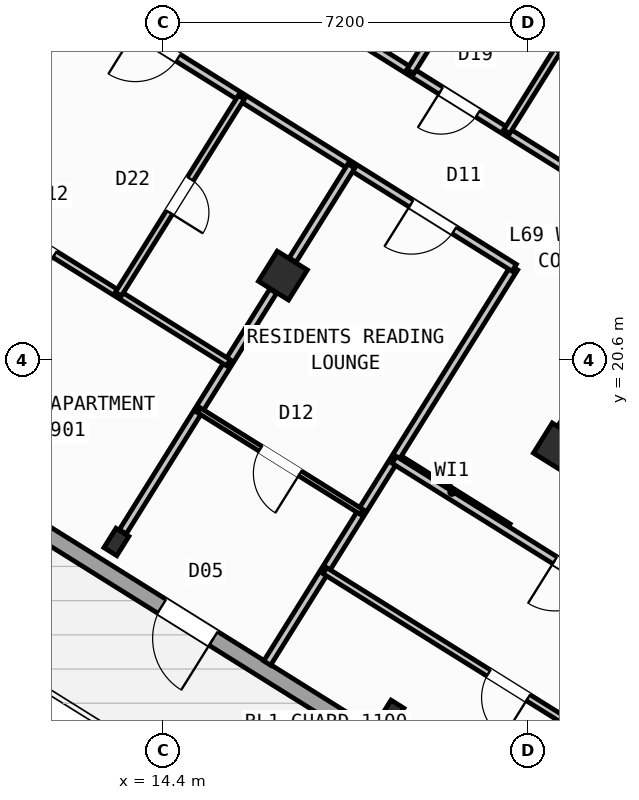
"""IFC4 building model, lengths in metres.
Left out: names, types, materials, properties, quantities, classifications, styles, units other than length and angle.
Written with IfcOpenShell. Run it as: python <this file> out.ifc"""

import sys

from ifc_helpers import new_model, si_unit, direction, frame, frame_2d, origin, origin_2d, place, context, subcontext, project, spatial, rectangle, hollow_rectangle, i_section, extrude, source, transform, mapped, element, fill, save


model = new_model("IFC4")
c1 = context("Model", 3, precision=1e-05, world=origin(), true_north=direction((0.0, 1.0)))
c2 = subcontext(c1, "Body", "Model", "MODEL_VIEW")
j1 = project(units=[si_unit("LENGTHUNIT", "METRE"), si_unit("PLANEANGLEUNIT", "RADIAN")], contexts=[c1])
p1 = place(None, origin())
s1 = spatial("IfcSite", under=j1, at=p1, CompositionType="ELEMENT")
p2 = place(p1, origin())
s2 = spatial("IfcBuilding", under=s1, at=p2, CompositionType="ELEMENT")
p3 = place(p2, frame((0.0, 0.0, 273.6)))
s3 = spatial("IfcBuildingStorey", under=s2, at=p3, CompositionType="ELEMENT", Elevation=273.6)
p4 = place(p3, frame((33.324, 12.503, 0.0), z_axis=(0.0, 0.0, 1.0), x_axis=(-0.848043529849, 0.529926571782, 0.0)))
e1 = element("IfcWall", 1, at=p4, inside=s3, PredefinedType="SHEAR", context=c2, shape_type="SweptSolid", body=[
    extrude(rectangle(XDim=13.04, YDim=0.45, at=frame_2d((6.52, 0.0))), origin(), (0.0, 0.0, 1.0), 3.35),
])
m1 = source(origin(), c2, "Body", "SweptSolid", [
    extrude(hollow_rectangle(XDim=0.7, YDim=0.7, WallThickness=0.028, at=origin_2d()), origin(), (0.0, 0.0, 1.0), 3.6),
])
p5 = place(p3, frame((22.191, 18.87, 0.0), z_axis=(0.0, 0.0, 1.0), x_axis=(-0.848048096156, 0.529919264233, 0.0)))
e2 = element("IfcColumn", 2, at=p5, inside=s3, PredefinedType="COLUMN", context=c2, shape_type="MappedRepresentation", body=[
    mapped(m1, transform((0.0, 0.0, 0.0), scale=1.0)),
])
m2 = source(origin(), c2, "Body", "SweptSolid", [
    extrude(i_section(OverallWidth=0.3, OverallDepth=0.45, WebThickness=0.014, FlangeThickness=0.026, at=origin_2d()), origin(), (0.0, 0.0, 1.0), 3.6),
])
p6 = place(p3, frame((18.906, 13.612, 0.0), z_axis=(0.0, 0.0, 1.0), x_axis=(-0.848048096156, 0.529919264233, 0.0)))
e3 = element("IfcColumn", 3, at=p6, inside=s3, PredefinedType="COLUMN", context=c2, shape_type="MappedRepresentation", body=[
    mapped(m2, transform((0.0, 0.0, 0.0), scale=1.0)),
])
p7 = place(p3, frame((16.764, 22.261, 0.0), z_axis=(0.0, 0.0, 1.0), x_axis=(-0.848048096156, 0.529919264233, 0.0)))
e4 = element("IfcColumn", 4, at=p7, inside=s3, PredefinedType="COLUMN", context=c2, shape_type="MappedRepresentation", body=[
    mapped(m1, transform((0.0, 0.0, 0.0), scale=1.0)),
])
p8 = place(p3, frame((13.478, 17.003, 0.0), z_axis=(0.0, 0.0, 1.0), x_axis=(-0.848048096156, 0.529919264233, 0.0)))
e5 = element("IfcColumn", 5, at=p8, inside=s3, PredefinedType="COLUMN", context=c2, shape_type="MappedRepresentation", body=[
    mapped(m2, transform((0.0, 0.0, 0.0), scale=1.0)),
])
p9 = place(p3, frame((29.268, 6.429, 0.0), z_axis=(0.0, 0.0, 1.0), x_axis=(-0.848049971435, 0.529916263149, 0.0)))
e6 = element("IfcWall", 6, at=p9, inside=s3, PredefinedType="STANDARD", context=c2, shape_type="SweptSolid", body=[
    extrude(rectangle(XDim=31.588, YDim=0.32, at=frame_2d((15.794, 0.0))), origin(), (0.0, 0.0, 1.0), 3.35),
])
p10 = place(p9, frame((16.362, 0.0, 0.0)))
e7 = element("IfcOpeningElement", 7, at=p10, cuts=e6, PredefinedType="OPENING", context=c2, shape_type="SweptSolid", body=[
    extrude(rectangle(XDim=1.2, YDim=2.15, at=frame_2d((0.6, 1.075))), frame((0.0, 0.17, 0.0), z_axis=(0.0, -1.0, 0.0), x_axis=(1.0, 0.0, 0.0)), (0.0, 0.0, 1.0), 0.34),
])
p11 = place(p9, frame((3.859, 0.0, 0.9)))
e8 = element("IfcOpeningElement", 8, at=p11, cuts=e6, PredefinedType="OPENING", context=c2, shape_type="SweptSolid", body=[
    extrude(rectangle(XDim=1.65, YDim=1.45, at=frame_2d((0.825, 0.725))), frame((0.0, 0.17, 0.0), z_axis=(0.0, -1.0, 0.0), x_axis=(1.0, 0.0, 0.0)), (0.0, 0.0, 1.0), 0.34),
])
p12 = place(p9, frame((10.519, 0.0, 0.9)))
e9 = element("IfcOpeningElement", 9, at=p12, cuts=e6, PredefinedType="OPENING", context=c2, shape_type="SweptSolid", body=[
    extrude(rectangle(XDim=1.65, YDim=1.45, at=frame_2d((0.825, 0.725))), frame((0.0, 0.17, 0.0), z_axis=(0.0, -1.0, 0.0), x_axis=(1.0, 0.0, 0.0)), (0.0, 0.0, 1.0), 0.34),
])
p13 = place(p9, frame((21.219, 0.0, 0.95)))
e10 = element("IfcOpeningElement", 10, at=p13, cuts=e6, PredefinedType="OPENING", context=c2, shape_type="SweptSolid", body=[
    extrude(rectangle(XDim=1.95, YDim=1.35, at=frame_2d((0.975, 0.675))), frame((0.0, 0.17, 0.0), z_axis=(0.0, -1.0, 0.0), x_axis=(1.0, 0.0, 0.0)), (0.0, 0.0, 1.0), 0.34),
])
p14 = place(p9, frame((26.406, 0.0, 1.0)))
e11 = element("IfcOpeningElement", 11, at=p14, cuts=e6, PredefinedType="OPENING", context=c2, shape_type="SweptSolid", body=[
    extrude(rectangle(XDim=0.9, YDim=1.25, at=frame_2d((0.45, 0.625))), frame((0.0, 0.17, 0.0), z_axis=(0.0, -1.0, 0.0), x_axis=(1.0, 0.0, 0.0)), (0.0, 0.0, 1.0), 0.34),
])
p15 = place(p9, frame((29.143, 0.0, 0.9)))
e12 = element("IfcOpeningElement", 12, at=p15, cuts=e6, PredefinedType="OPENING", context=c2, shape_type="SweptSolid", body=[
    extrude(rectangle(XDim=1.65, YDim=1.45, at=frame_2d((0.825, 0.725))), frame((0.0, 0.17, 0.0), z_axis=(0.0, -1.0, 0.0), x_axis=(1.0, 0.0, 0.0)), (0.0, 0.0, 1.0), 0.34),
])
p16 = place(p3, frame((2.415, 23.452, 0.0), z_axis=(0.0, 0.0, 1.0), x_axis=(0.52991049553, 0.848053575387, 0.0)))
e13 = element("IfcWall", 13, at=p16, inside=s3, PredefinedType="STANDARD", context=c2, shape_type="SweptSolid", body=[
    extrude(rectangle(XDim=21.587, YDim=0.32, at=frame_2d((10.794, 0.0))), origin(), (0.0, 0.0, 1.0), 2.875),
])
p17 = place(p16, frame((2.606, 0.0, 0.9)))
e14 = element("IfcOpeningElement", 14, at=p17, cuts=e13, PredefinedType="OPENING", context=c2, shape_type="SweptSolid", body=[
    extrude(rectangle(XDim=1.65, YDim=1.45, at=frame_2d((0.825, 0.725))), frame((0.0, 0.17, 0.0), z_axis=(0.0, -1.0, 0.0), x_axis=(1.0, 0.0, 0.0)), (0.0, 0.0, 1.0), 0.34),
])
p18 = place(p16, frame((7.504, 0.0, 1.0)))
e15 = element("IfcOpeningElement", 15, at=p18, cuts=e13, PredefinedType="OPENING", context=c2, shape_type="SweptSolid", body=[
    extrude(rectangle(XDim=0.9, YDim=1.25, at=frame_2d((0.45, 0.625))), frame((0.0, 0.17, 0.0), z_axis=(0.0, -1.0, 0.0), x_axis=(1.0, 0.0, 0.0)), (0.0, 0.0, 1.0), 0.34),
])
p19 = place(p16, frame((12.084, 0.0, 1.0)))
e16 = element("IfcOpeningElement", 16, at=p19, cuts=e13, PredefinedType="OPENING", context=c2, shape_type="SweptSolid", body=[
    extrude(rectangle(XDim=0.9, YDim=1.25, at=frame_2d((0.45, 0.625))), frame((0.0, 0.17, 0.0), z_axis=(0.0, -1.0, 0.0), x_axis=(1.0, 0.0, 0.0)), (0.0, 0.0, 1.0), 0.34),
])
p20 = place(p16, frame((15.619, 0.0, 1.0)))
e17 = element("IfcOpeningElement", 17, at=p20, cuts=e13, PredefinedType="OPENING", context=c2, shape_type="SweptSolid", body=[
    extrude(rectangle(XDim=0.9, YDim=1.25, at=frame_2d((0.45, 0.625))), frame((0.0, 0.17, 0.0), z_axis=(0.0, -1.0, 0.0), x_axis=(1.0, 0.0, 0.0)), (0.0, 0.0, 1.0), 0.34),
])
p21 = place(p16, frame((18.569, 0.0, 1.0)))
e18 = element("IfcOpeningElement", 18, at=p21, cuts=e13, PredefinedType="OPENING", context=c2, shape_type="SweptSolid", body=[
    extrude(rectangle(XDim=0.9, YDim=1.25, at=frame_2d((0.45, 0.625))), frame((0.0, 0.17, 0.0), z_axis=(0.0, -1.0, 0.0), x_axis=(1.0, 0.0, 0.0)), (0.0, 0.0, 1.0), 0.34),
])
p22 = place(p3, frame((14.138, 41.825, 0.0), z_axis=(0.0, 0.0, 1.0), x_axis=(0.848046498049, -0.529921821731, 0.0)))
e19 = element("IfcWall", 19, at=p22, inside=s3, PredefinedType="STANDARD", context=c2, shape_type="SweptSolid", body=[
    extrude(rectangle(XDim=31.588, YDim=0.32, at=frame_2d((15.794, 0.0))), origin(), (0.0, 0.0, 1.0), 3.35),
])
p23 = place(p22, frame((3.46, 0.0, 0.0)))
e20 = element("IfcOpeningElement", 20, at=p23, cuts=e19, PredefinedType="OPENING", context=c2, shape_type="SweptSolid", body=[
    extrude(rectangle(XDim=1.05, YDim=2.15, at=frame_2d((0.525, 1.075))), frame((0.0, 0.17, 0.0), z_axis=(0.0, -1.0, 0.0), x_axis=(1.0, 0.0, 0.0)), (0.0, 0.0, 1.0), 0.34),
])
p24 = place(p22, frame((0.831, 0.0, 1.0)))
e21 = element("IfcOpeningElement", 21, at=p24, cuts=e19, PredefinedType="OPENING", context=c2, shape_type="SweptSolid", body=[
    extrude(rectangle(XDim=0.9, YDim=1.25, at=frame_2d((0.45, 0.625))), frame((0.0, 0.17, 0.0), z_axis=(0.0, -1.0, 0.0), x_axis=(1.0, 0.0, 0.0)), (0.0, 0.0, 1.0), 0.34),
])
p25 = place(p22, frame((8.719, 0.0, 0.9)))
e22 = element("IfcOpeningElement", 22, at=p25, cuts=e19, PredefinedType="OPENING", context=c2, shape_type="SweptSolid", body=[
    extrude(rectangle(XDim=1.35, YDim=1.45, at=frame_2d((0.675, 0.725))), frame((0.0, 0.17, 0.0), z_axis=(0.0, -1.0, 0.0), x_axis=(1.0, 0.0, 0.0)), (0.0, 0.0, 1.0), 0.34),
])
p26 = place(p22, frame((13.599, 0.0, 0.95)))
e23 = element("IfcOpeningElement", 23, at=p26, cuts=e19, PredefinedType="OPENING", context=c2, shape_type="SweptSolid", body=[
    extrude(rectangle(XDim=1.95, YDim=1.35, at=frame_2d((0.975, 0.675))), frame((0.0, 0.17, 0.0), z_axis=(0.0, -1.0, 0.0), x_axis=(1.0, 0.0, 0.0)), (0.0, 0.0, 1.0), 0.34),
])
p27 = place(p22, frame((17.154, 0.0, 1.0)))
e24 = element("IfcOpeningElement", 24, at=p27, cuts=e19, PredefinedType="OPENING", context=c2, shape_type="SweptSolid", body=[
    extrude(rectangle(XDim=0.9, YDim=1.25, at=frame_2d((0.45, 0.625))), frame((0.0, 0.17, 0.0), z_axis=(0.0, -1.0, 0.0), x_axis=(1.0, 0.0, 0.0)), (0.0, 0.0, 1.0), 0.34),
])
p28 = place(p22, frame((21.719, 0.0, 0.9)))
e25 = element("IfcOpeningElement", 25, at=p28, cuts=e19, PredefinedType="OPENING", context=c2, shape_type="SweptSolid", body=[
    extrude(rectangle(XDim=1.65, YDim=1.45, at=frame_2d((0.825, 0.725))), frame((0.0, 0.17, 0.0), z_axis=(0.0, -1.0, 0.0), x_axis=(1.0, 0.0, 0.0)), (0.0, 0.0, 1.0), 0.34),
])
p29 = place(p22, frame((27.419, 0.0, 0.9)))
e26 = element("IfcOpeningElement", 26, at=p29, cuts=e19, PredefinedType="OPENING", context=c2, shape_type="SweptSolid", body=[
    extrude(rectangle(XDim=1.65, YDim=1.45, at=frame_2d((0.825, 0.725))), frame((0.0, 0.17, 0.0), z_axis=(0.0, -1.0, 0.0), x_axis=(1.0, 0.0, 0.0)), (0.0, 0.0, 1.0), 0.34),
])
p30 = place(p3, frame((21.206, 17.292, 0.0), z_axis=(0.0, 0.0, 1.0), x_axis=(-0.848050851465, 0.529914854792, 0.0)))
e27 = element("IfcWall", 27, at=p30, inside=s3, PredefinedType="PARTITIONING", context=c2, shape_type="SweptSolid", body=[
    extrude(rectangle(XDim=2.61, YDim=0.16, at=frame_2d((1.305, 0.0))), origin(), (0.0, 0.0, 1.0), 3.34),
])
p31 = place(p3, frame((21.329, 22.416, 0.0), z_axis=(0.0, 0.0, 1.0), x_axis=(-0.529920220799, -0.848047498427, 0.0)))
e28 = element("IfcWall", 28, at=p31, inside=s3, PredefinedType="PARTITIONING", context=c2, shape_type="SweptSolid", body=[
    extrude(rectangle(XDim=9.2, YDim=0.16, at=frame_2d((4.6, 0.0))), origin(), (0.0, 0.0, 1.0), 3.34),
])
p32 = place(p3, frame((22.495, 24.281, 0.0), z_axis=(0.0, 0.0, 1.0), x_axis=(-0.848052408131, 0.529912363569, 0.0)))
e29 = element("IfcWall", 29, at=p32, inside=s3, PredefinedType="PARTITIONING", context=c2, shape_type="SweptSolid", body=[
    extrude(rectangle(XDim=16.73, YDim=0.16, at=frame_2d((8.365, 0.0))), origin(), (0.0, 0.0, 1.0), 3.34),
])
p33 = place(p32, frame((2.22, 0.0, 0.0)))
e30 = element("IfcOpeningElement", 30, at=p33, cuts=e29, PredefinedType="OPENING", context=c2, shape_type="SweptSolid", body=[
    extrude(rectangle(XDim=0.86, YDim=2.05, at=frame_2d((0.43, 1.025))), frame((0.0, 0.09, 0.0), z_axis=(0.0, -1.0, 0.0), x_axis=(1.0, 0.0, 0.0)), (0.0, 0.0, 1.0), 0.18),
])
p34 = place(p32, frame((6.49, 0.0, 0.0)))
e31 = element("IfcOpeningElement", 31, at=p34, cuts=e29, PredefinedType="OPENING", context=c2, shape_type="SweptSolid", body=[
    extrude(rectangle(XDim=1.0, YDim=2.1, at=frame_2d((0.5, 1.05))), frame((0.0, 0.09, 0.0), z_axis=(0.0, -1.0, 0.0), x_axis=(1.0, 0.0, 0.0)), (0.0, 0.0, 1.0), 0.18),
])
p35 = place(p32, frame((14.76, 0.0, 0.0)))
e32 = element("IfcOpeningElement", 32, at=p35, cuts=e29, PredefinedType="OPENING", context=c2, shape_type="SweptSolid", body=[
    extrude(rectangle(XDim=1.0, YDim=2.1, at=frame_2d((0.5, 1.05))), frame((0.0, 0.09, 0.0), z_axis=(0.0, -1.0, 0.0), x_axis=(1.0, 0.0, 0.0)), (0.0, 0.0, 1.0), 0.18),
])
p36 = place(p3, frame((21.329, 22.416, 0.0), z_axis=(0.0, 0.0, 1.0), x_axis=(-0.848052408131, 0.529912363569, 0.0)))
e33 = element("IfcWall", 33, at=p36, inside=s3, PredefinedType="PARTITIONING", context=c2, shape_type="SweptSolid", body=[
    extrude(rectangle(XDim=16.73, YDim=0.16, at=frame_2d((8.365, 0.0))), origin(), (0.0, 0.0, 1.0), 3.34),
])
p37 = place(p36, frame((1.395, 0.0, 0.0)))
e34 = element("IfcOpeningElement", 34, at=p37, cuts=e33, PredefinedType="OPENING", context=c2, shape_type="SweptSolid", body=[
    extrude(rectangle(XDim=1.0, YDim=2.1, at=frame_2d((0.5, 1.05))), frame((0.0, 0.09, 0.0), z_axis=(0.0, -1.0, 0.0), x_axis=(1.0, 0.0, 0.0)), (0.0, 0.0, 1.0), 0.18),
])
p38 = place(p36, frame((7.82, 0.0, 0.0)))
e35 = element("IfcOpeningElement", 35, at=p38, cuts=e33, PredefinedType="OPENING", context=c2, shape_type="SweptSolid", body=[
    extrude(rectangle(XDim=1.0, YDim=2.1, at=frame_2d((0.5, 1.05))), frame((0.0, 0.09, 0.0), z_axis=(0.0, -1.0, 0.0), x_axis=(1.0, 0.0, 0.0)), (0.0, 0.0, 1.0), 0.18),
])
p39 = place(p36, frame((11.14, 0.0, 0.0)))
e36 = element("IfcOpeningElement", 36, at=p39, cuts=e33, PredefinedType="OPENING", context=c2, shape_type="SweptSolid", body=[
    extrude(rectangle(XDim=1.0, YDim=2.1, at=frame_2d((0.5, 1.05))), frame((0.0, 0.09, 0.0), z_axis=(0.0, -1.0, 0.0), x_axis=(1.0, 0.0, 0.0)), (0.0, 0.0, 1.0), 0.18),
])
p40 = place(p3, frame((18.115, 24.424, 0.0), z_axis=(0.0, 0.0, 1.0), x_axis=(-0.529998940003, -0.847998304005, 0.0)))
e37 = element("IfcWall", 37, at=p40, inside=s3, PredefinedType="PARTITIONING", context=c2, shape_type="SweptSolid", body=[
    extrude(rectangle(XDim=2.188, YDim=0.16, at=frame_2d((1.094, 0.0))), origin(), (0.0, 0.0, 1.0), 2.875),
])
p41 = place(p3, frame((16.572, 21.954, 0.0), z_axis=(0.0, 0.0, 1.0), x_axis=(-0.529904903214, -0.848057069748, 0.0)))
e38 = element("IfcWall", 38, at=p41, inside=s3, PredefinedType="PARTITIONING", context=c2, shape_type="SweptSolid", body=[
    extrude(rectangle(XDim=5.601, YDim=0.16, at=frame_2d((2.801, 0.0))), origin(), (0.0, 0.0, 1.0), 2.875),
])
p42 = place(p3, frame((18.318, 17.597, 0.0), z_axis=(0.0, 0.0, 1.0), x_axis=(-0.848059820872, 0.529900500304, 0.0)))
e39 = element("IfcWall", 39, at=p42, inside=s3, PredefinedType="PARTITIONING", context=c2, shape_type="SweptSolid", body=[
    extrude(rectangle(XDim=3.79, YDim=0.11, at=frame_2d((1.895, 0.0))), origin(), (0.0, 0.0, 1.0), 3.34),
])
p43 = place(p42, frame((1.435, 0.0, 0.0)))
e40 = element("IfcOpeningElement", 40, at=p43, cuts=e39, PredefinedType="OPENING", context=c2, shape_type="SweptSolid", body=[
    extrude(rectangle(XDim=0.92, YDim=2.08, at=frame_2d((0.46, 1.04))), frame((0.0, 0.065, 0.0), z_axis=(0.0, -1.0, 0.0), x_axis=(1.0, 0.0, 0.0)), (0.0, 0.0, 1.0), 0.13),
])
p44 = place(p3, frame((12.688, 27.815, 0.0), z_axis=(0.0, 0.0, 1.0), x_axis=(-0.52994879608, -0.848029641896, 0.0)))
e41 = element("IfcWall", 41, at=p44, inside=s3, PredefinedType="PARTITIONING", context=c2, shape_type="SweptSolid", body=[
    extrude(rectangle(XDim=2.188, YDim=0.16, at=frame_2d((1.094, 0.0))), origin(), (0.0, 0.0, 1.0), 2.875),
])
p45 = place(p3, frame((15.688, 20.54, 0.0), z_axis=(0.0, 0.0, 1.0), x_axis=(-0.848049732085, 0.529916646191, 0.0)))
e42 = element("IfcWall", 42, at=p45, inside=s3, PredefinedType="PLUMBINGWALL", context=c2, shape_type="SweptSolid", body=[
    extrude(rectangle(XDim=6.4, YDim=0.14, at=frame_2d((3.2, 0.0))), origin(), (0.0, 0.0, 1.0), 3.34),
])
p46 = place(p45, frame((4.04, 0.0, 0.0)))
e43 = element("IfcOpeningElement", 43, at=p46, cuts=e42, PredefinedType="OPENING", context=c2, shape_type="SweptSolid", body=[
    extrude(rectangle(XDim=0.92, YDim=2.08, at=frame_2d((0.46, 1.04))), frame((0.0, 0.08, 0.0), z_axis=(0.0, -1.0, 0.0), x_axis=(1.0, 0.0, 0.0)), (0.0, 0.0, 1.0), 0.16),
])
p47 = place(p3, frame((15.944, 25.781, 0.0), z_axis=(0.0, 0.0, 1.0), x_axis=(-0.529917480809, -0.848049210561, 0.0)))
e44 = element("IfcWall", 44, at=p47, inside=s3, PredefinedType="PLUMBINGWALL", context=c2, shape_type="SweptSolid", body=[
    extrude(rectangle(XDim=4.58, YDim=0.14, at=frame_2d((2.29, 0.0))), origin(), (0.0, 0.0, 1.0), 3.34),
])
p48 = place(p47, frame((1.9, 0.0, 0.0)))
e45 = element("IfcOpeningElement", 45, at=p48, cuts=e44, PredefinedType="OPENING", context=c2, shape_type="SweptSolid", body=[
    extrude(rectangle(XDim=0.78, YDim=2.05, at=frame_2d((0.39, 1.025))), frame((0.0, 0.08, 0.0), z_axis=(0.0, -1.0, 0.0), x_axis=(1.0, 0.0, 0.0)), (0.0, 0.0, 1.0), 0.16),
])
p49 = place(p3, frame((20.44, 28.145, 0.0), z_axis=(0.0, 0.0, 1.0), x_axis=(-0.5299186965, -0.848048450915, 0.0)))
e46 = element("IfcWall", 46, at=p49, inside=s3, PredefinedType="PARTITIONING", context=c2, shape_type="SweptSolid", body=[
    extrude(rectangle(XDim=2.188, YDim=0.16, at=frame_2d((1.094, 0.0))), origin(), (0.0, 0.0, 1.0), 2.875),
])
p50 = place(p3, frame((23.57, 28.927, 0.0), z_axis=(0.0, 0.0, 1.0), x_axis=(-0.529911350634, -0.84805304107, 0.0)))
e47 = element("IfcWall", 47, at=p50, inside=s3, PredefinedType="PLUMBINGWALL", context=c2, shape_type="SweptSolid", body=[
    extrude(rectangle(XDim=4.51, YDim=0.14, at=frame_2d((2.255, 0.0))), origin(), (0.0, 0.0, 1.0), 3.025),
])
p51 = place(p50, frame((1.865, 0.0, 0.0)))
e48 = element("IfcOpeningElement", 48, at=p51, cuts=e47, PredefinedType="OPENING", context=c2, shape_type="SweptSolid", body=[
    extrude(rectangle(XDim=0.78, YDim=2.05, at=frame_2d((0.39, 1.025))), frame((0.0, 0.08, 0.0), z_axis=(0.0, -1.0, 0.0), x_axis=(1.0, 0.0, 0.0)), (0.0, 0.0, 1.0), 0.16),
])
p52 = place(p3, frame((32.164, 10.374, 0.0), z_axis=(0.0, 0.0, 1.0), x_axis=(-0.848044107957, 0.529925646633, 0.0)))
e49 = element("IfcWall", 49, at=p52, inside=s3, PredefinedType="PARTITIONING", context=c2, shape_type="SweptSolid", body=[
    extrude(rectangle(XDim=15.57, YDim=0.16, at=frame_2d((7.785, 0.0))), origin(), (0.0, 0.0, 1.0), 3.34),
])
p53 = place(p52, frame((10.83, 0.0, 0.0)))
e50 = element("IfcOpeningElement", 50, at=p53, cuts=e49, PredefinedType="OPENING", context=c2, shape_type="SweptSolid", body=[
    extrude(rectangle(XDim=1.0, YDim=2.1, at=frame_2d((0.5, 1.05))), frame((0.0, 0.09, 0.0), z_axis=(0.0, -1.0, 0.0), x_axis=(1.0, 0.0, 0.0)), (0.0, 0.0, 1.0), 0.18),
])
p54 = place(p3, frame((29.72, 8.859, 0.0), z_axis=(0.0, 0.0, 1.0), x_axis=(-0.848049134363, 0.529917602752, 0.0)))
e51 = element("IfcWall", 51, at=p54, inside=s3, PredefinedType="PLUMBINGWALL", context=c2, shape_type="SweptSolid", body=[
    extrude(rectangle(XDim=14.3, YDim=0.14, at=frame_2d((7.15, 0.0))), origin(), (0.0, 0.0, 1.0), 3.34),
])
p55 = place(p54, frame((9.57, 0.0, 0.0)))
e52 = element("IfcOpeningElement", 52, at=p55, cuts=e51, PredefinedType="OPENING", context=c2, shape_type="SweptSolid", body=[
    extrude(rectangle(XDim=0.92, YDim=2.08, at=frame_2d((0.46, 1.04))), frame((0.0, 0.08, 0.0), z_axis=(0.0, -1.0, 0.0), x_axis=(1.0, 0.0, 0.0)), (0.0, 0.0, 1.0), 0.16),
])
m3 = source(origin(), c2, "Body", "SweptSolid", [
    extrude(rectangle(XDim=1.2, YDim=2.15, at=frame_2d((0.6, 1.075))), frame((0.0, 0.025, 0.0), z_axis=(0.0, -1.0, 0.0), x_axis=(1.0, 0.0, 0.0)), (0.0, 0.0, 1.0), 0.05),
])
p56 = place(p10, origin())
e53 = element("IfcDoor", 53, at=p56, inside=s3, OperationType="SINGLE_SWING_LEFT", PredefinedType="DOOR", context=c2, shape_type="MappedRepresentation", body=[
    mapped(m3, transform((0.0, 0.0, 0.0), scale=1.0)),
])
fill(e7, e53)
m4 = source(origin(), c2, "Body", "SweptSolid", [
    extrude(rectangle(XDim=1.0, YDim=2.1, at=frame_2d((0.5, 1.05))), frame((0.0, 0.025, 0.0), z_axis=(0.0, -1.0, 0.0), x_axis=(1.0, 0.0, 0.0)), (0.0, 0.0, 1.0), 0.05),
])
p57 = place(p37, origin())
e54 = element("IfcDoor", 54, at=p57, inside=s3, OperationType="SINGLE_SWING_RIGHT", PredefinedType="DOOR", context=c2, shape_type="MappedRepresentation", body=[
    mapped(m4, transform((0.0, 0.0, 0.0), scale=1.0)),
])
fill(e34, e54)
m5 = source(origin(), c2, "Body", "SweptSolid", [
    extrude(rectangle(XDim=0.92, YDim=2.08, at=frame_2d((0.46, 1.04))), frame((0.0, 0.025, 0.0), z_axis=(0.0, -1.0, 0.0), x_axis=(1.0, 0.0, 0.0)), (0.0, 0.0, 1.0), 0.05),
])
p58 = place(p43, origin())
e55 = element("IfcDoor", 55, at=p58, inside=s3, OperationType="SINGLE_SWING_LEFT", PredefinedType="DOOR", context=c2, shape_type="MappedRepresentation", body=[
    mapped(m5, transform((0.0, 0.0, 0.0), scale=1.0)),
])
fill(e40, e55)
p59 = place(p38, origin())
e56 = element("IfcDoor", 56, at=p59, inside=s3, OperationType="SINGLE_SWING_RIGHT", PredefinedType="DOOR", context=c2, shape_type="MappedRepresentation", body=[
    mapped(m4, transform((0.0, 0.0, 0.0), scale=1.0)),
])
fill(e35, e56)
p60 = place(p46, origin())
e57 = element("IfcDoor", 57, at=p60, inside=s3, OperationType="SINGLE_SWING_LEFT", PredefinedType="DOOR", context=c2, shape_type="MappedRepresentation", body=[
    mapped(m5, transform((0.0, 0.0, 0.0), scale=1.0)),
])
fill(e43, e57)
m6 = source(origin(), c2, "Body", "SweptSolid", [
    extrude(rectangle(XDim=0.78, YDim=2.05, at=frame_2d((0.39, 1.025))), frame((0.0, 0.025, 0.0), z_axis=(0.0, -1.0, 0.0), x_axis=(1.0, 0.0, 0.0)), (0.0, 0.0, 1.0), 0.05),
])
p61 = place(p48, origin())
e58 = element("IfcDoor", 58, at=p61, inside=s3, OperationType="SINGLE_SWING_RIGHT", PredefinedType="DOOR", context=c2, shape_type="MappedRepresentation", body=[
    mapped(m6, transform((0.0, 0.0, 0.0), scale=1.0)),
])
fill(e45, e58)
m7 = source(origin(), c2, "Body", "SweptSolid", [
    extrude(rectangle(XDim=0.86, YDim=2.05, at=frame_2d((0.43, 1.025))), frame((0.0, 0.025, 0.0), z_axis=(0.0, -1.0, 0.0), x_axis=(1.0, 0.0, 0.0)), (0.0, 0.0, 1.0), 0.05),
])
p62 = place(p33, origin())
e59 = element("IfcDoor", 59, at=p62, inside=s3, OperationType="SINGLE_SWING_RIGHT", PredefinedType="DOOR", context=c2, shape_type="MappedRepresentation", body=[
    mapped(m7, transform((0.0, 0.0, 0.0), scale=1.0)),
])
fill(e30, e59)
p63 = place(p51, origin())
e60 = element("IfcDoor", 60, at=p63, inside=s3, OperationType="SINGLE_SWING_RIGHT", PredefinedType="DOOR", context=c2, shape_type="MappedRepresentation", body=[
    mapped(m6, transform((0.0, 0.0, 0.0), scale=1.0)),
])
fill(e48, e60)
p64 = place(p53, origin())
e61 = element("IfcDoor", 61, at=p64, inside=s3, OperationType="SINGLE_SWING_RIGHT", PredefinedType="DOOR", context=c2, shape_type="MappedRepresentation", body=[
    mapped(m4, transform((0.0, 0.0, 0.0), scale=1.0)),
])
fill(e50, e61)
p65 = place(p55, origin())
e62 = element("IfcDoor", 62, at=p65, inside=s3, OperationType="SINGLE_SWING_LEFT", PredefinedType="DOOR", context=c2, shape_type="MappedRepresentation", body=[
    mapped(m5, transform((0.0, 0.0, 0.0), scale=1.0)),
])
fill(e52, e62)
save(model, sys.argv[1])
